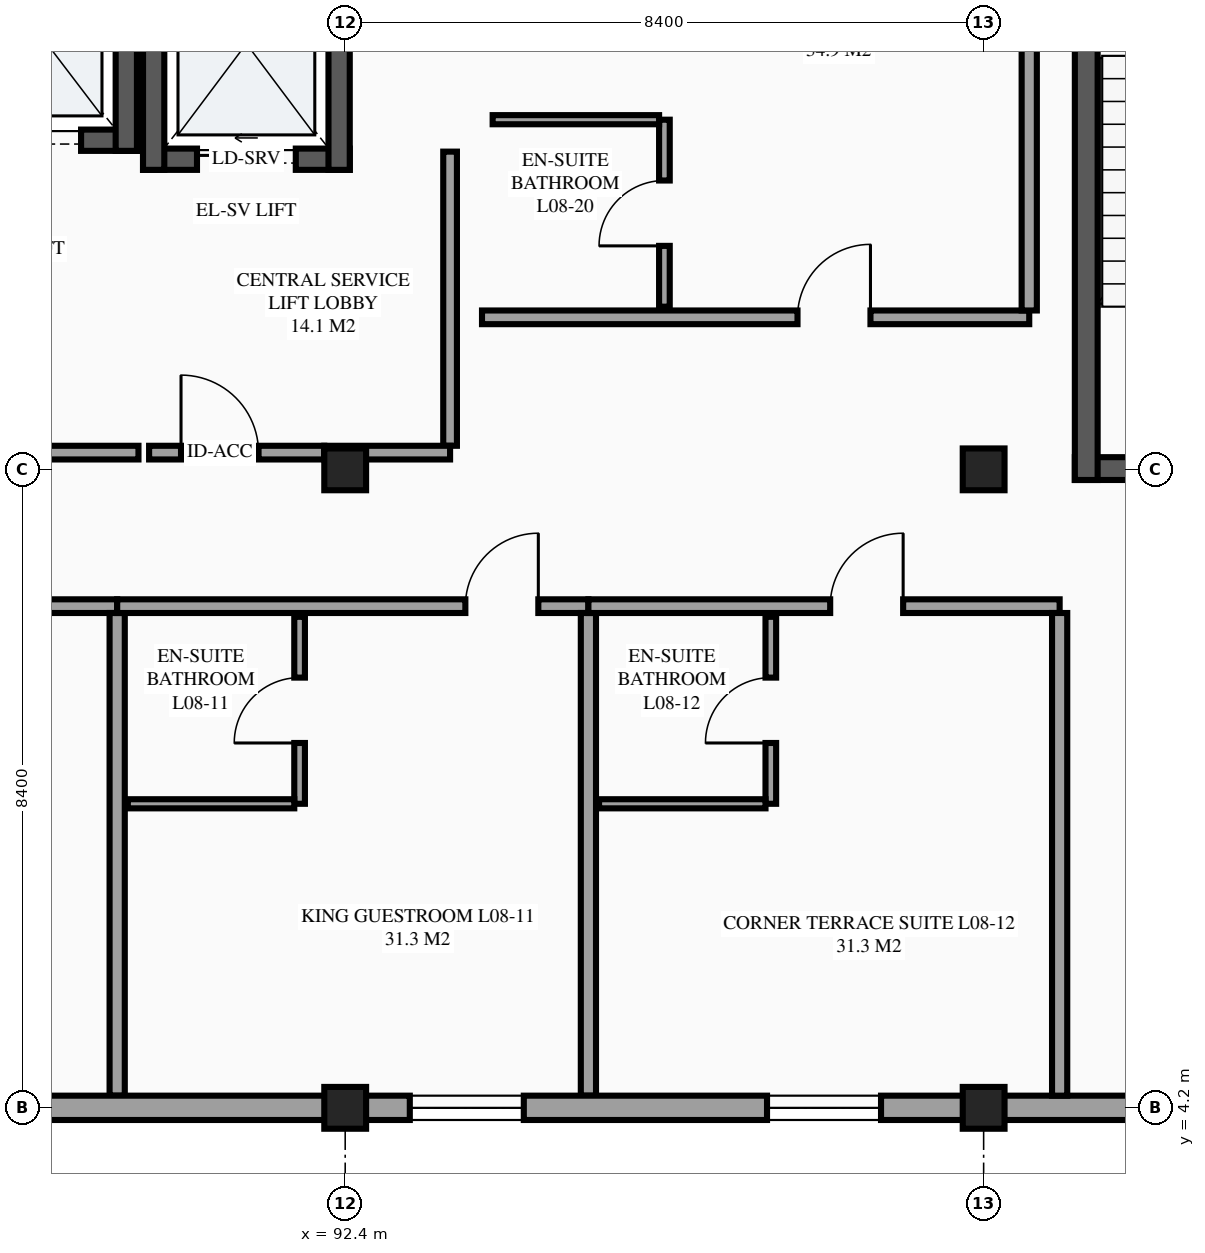
"""IFC4 building model, lengths in metres.
Left out: names, types, materials, properties, quantities, classifications, styles, units other than length and angle.
Written with IfcOpenShell. Run it as: python <this file> out.ifc"""

import sys

from ifc_helpers import new_model, si_unit, direction, frame, frame_2d, origin, origin_2d, place, context, subcontext, project, spatial, rectangle, extrude, element, fill, save


model = new_model("IFC4")
c1 = context("Model", 3, precision=1e-05, world=origin(), true_north=direction((0.0, 1.0)))
c2 = subcontext(c1, "Body", "Model", "MODEL_VIEW")
j1 = project(units=[si_unit("LENGTHUNIT", "METRE"), si_unit("PLANEANGLEUNIT", "RADIAN")], contexts=[c1])
p1 = place(None, origin())
s1 = spatial("IfcSite", under=j1, at=p1, CompositionType="ELEMENT")
p2 = place(p1, origin())
s2 = spatial("IfcBuilding", under=s1, at=p2, CompositionType="ELEMENT")
p3 = place(p2, frame((0.0, 0.0, 32.7)))
s3 = spatial("IfcBuildingStorey", under=s2, at=p3, CompositionType="ELEMENT", Elevation=32.7)
for number, where, z_axis, x_axis in (
    (1, (92.4, 4.2, 0.0), (0.0, 0.0, 1.0), (1.0, 0.0, 0.0)),
    (2, (92.4, 12.6, 0.0), (0.0, 0.0, 1.0), (1.0, 0.0, 0.0)),
    (3, (100.8, 4.2, 0.0), (0.0, 0.0, 1.0), (1.0, 0.0, 0.0)),
    (4, (100.8, 12.6, 0.0), (0.0, 0.0, 1.0), (1.0, 0.0, 0.0)),
):
    element("IfcColumn", number, at=place(p3, frame(where, z_axis=z_axis, x_axis=x_axis)), inside=s3, PredefinedType="COLUMN", context=c2, shape_type="SweptSolid", body=[
        extrude(rectangle(XDim=0.55, YDim=0.55, at=origin_2d()), origin(), (0.0, 0.0, 1.0), 3.6),
    ])
p4 = place(p3, frame((100.8, 4.2, 0.0), z_axis=(0.0, 0.0, 1.0), x_axis=(1.0, 0.0, 0.0)))
e5 = element("IfcWall", 5, at=p4, inside=s3, PredefinedType="STANDARD", context=c2, shape_type="SweptSolid", body=[
    extrude(rectangle(XDim=16.8, YDim=0.32, at=frame_2d((8.4, 0.0))), origin(), (0.0, 0.0, 1.0), 2.63),
])
p5 = place(p4, frame((10.6, 0.0, 0.85)))
e6 = element("IfcOpeningElement", 6, at=p5, cuts=e5, PredefinedType="OPENING", context=c2, shape_type="SweptSolid", body=[
    extrude(rectangle(XDim=1.2, YDim=1.5, at=frame_2d((0.6, 0.75))), frame((0.0, 0.17, 0.0), z_axis=(0.0, -1.0, 0.0), x_axis=(1.0, 0.0, 0.0)), (0.0, 0.0, 1.0), 0.34),
])
p6 = place(p3, frame((87.14, 16.93, 0.0), z_axis=(0.0, 0.0, 1.0), x_axis=(1.0, 0.0, 0.0)))
e7 = element("IfcWall", 7, at=p6, inside=s3, PredefinedType="SHEAR", context=c2, shape_type="SweptSolid", body=[
    extrude(rectangle(XDim=2.52, YDim=0.28, at=frame_2d((1.26, 0.0))), origin(), (0.0, 0.0, 1.0), 3.6),
])
p7 = place(p6, frame((0.735, 0.0, 0.0)))
e8 = element("IfcOpeningElement", 8, at=p7, cuts=e7, PredefinedType="OPENING", context=c2, shape_type="SweptSolid", body=[
    extrude(rectangle(XDim=1.05, YDim=2.2, at=frame_2d((0.525, 1.1))), frame((0.0, 0.15, 0.0), z_axis=(0.0, -1.0, 0.0), x_axis=(1.0, 0.0, 0.0)), (0.0, 0.0, 1.0), 0.3),
])
p8 = place(p3, frame((89.52, 16.79, 0.0), z_axis=(0.0, 0.0, 1.0), x_axis=(0.0, 1.0, 0.0)))
e9 = element("IfcWall", 9, at=p8, inside=s3, PredefinedType="SHEAR", context=c2, shape_type="SweptSolid", body=[
    extrude(rectangle(XDim=3.02, YDim=0.28, at=frame_2d((1.51, 0.0))), origin(), (0.0, 0.0, 1.0), 3.6),
])
p9 = place(p3, frame((89.74, 16.68, 0.0), z_axis=(0.0, 0.0, 1.0), x_axis=(1.0, 0.0, 0.0)))
e10 = element("IfcWall", 10, at=p9, inside=s3, PredefinedType="SHEAR", context=c2, shape_type="SweptSolid", body=[
    extrude(rectangle(XDim=2.72, YDim=0.28, at=frame_2d((1.36, 0.0))), origin(), (0.0, 0.0, 1.0), 3.6),
])
p10 = place(p9, frame((0.71, 0.0, 0.0)))
e11 = element("IfcOpeningElement", 11, at=p10, cuts=e10, PredefinedType="OPENING", context=c2, shape_type="SweptSolid", body=[
    extrude(rectangle(XDim=1.3, YDim=2.25, at=frame_2d((0.65, 1.125))), frame((0.0, 0.15, 0.0), z_axis=(0.0, -1.0, 0.0), x_axis=(1.0, 0.0, 0.0)), (0.0, 0.0, 1.0), 0.3),
])
for number, where, z_axis, x_axis in (
    (12, (92.32, 16.54, 0.0), (0.0, 0.0, 1.0), (0.0, 1.0, 0.0)),
    (13, (89.88, 19.86, 0.0), (0.0, 0.0, 1.0), (0.0, -1.0, 0.0)),
):
    element("IfcWall", number, at=place(p3, frame(where, z_axis=z_axis, x_axis=x_axis)), inside=s3, PredefinedType="SHEAR", context=c2, shape_type="SweptSolid", body=[
        extrude(rectangle(XDim=3.32, YDim=0.28, at=frame_2d((1.66, 0.0))), origin(), (0.0, 0.0, 1.0), 3.6),
    ])
p11 = place(p3, frame((102.0, 12.61, 0.0), z_axis=(0.0, 0.0, 1.0), x_axis=(1.0, 0.0, 0.0)))
e14 = element("IfcWall", 14, at=p11, inside=s3, PredefinedType="SHEAR", context=c2, shape_type="SweptSolid", body=[
    extrude(rectangle(XDim=5.2, YDim=0.3, at=frame_2d((2.6, 0.0))), origin(), (0.0, 0.0, 1.0), 3.6),
])
p12 = place(p11, frame((2.025, 0.0, 0.0)))
e15 = element("IfcOpeningElement", 15, at=p12, cuts=e14, PredefinedType="OPENING", context=c2, shape_type="SweptSolid", body=[
    extrude(rectangle(XDim=1.15, YDim=2.15, at=frame_2d((0.575, 1.075))), frame((0.0, 0.16, 0.0), z_axis=(0.0, -1.0, 0.0), x_axis=(1.0, 0.0, 0.0)), (0.0, 0.0, 1.0), 0.32),
])
p13 = place(p3, frame((102.15, 21.3, 0.0), z_axis=(0.0, 0.0, 1.0), x_axis=(0.0, -1.0, 0.0)))
e16 = element("IfcWall", 16, at=p13, inside=s3, PredefinedType="SHEAR", context=c2, shape_type="SweptSolid", body=[
    extrude(rectangle(XDim=8.84, YDim=0.3, at=frame_2d((4.42, 0.0))), origin(), (0.0, 0.0, 1.0), 3.6),
])
p14 = place(p3, frame((83.2, 10.8, 0.0), z_axis=(0.0, 0.0, 1.0), x_axis=(1.0, 0.0, 0.0)))
e17 = element("IfcWall", 17, at=p14, inside=s3, PredefinedType="PARTITIONING", context=c2, shape_type="SweptSolid", body=[
    extrude(rectangle(XDim=6.2, YDim=0.18, at=frame_2d((3.1, 0.0))), origin(), (0.0, 0.0, 1.0), 3.375),
])
p15 = place(p14, frame((4.231, 0.0, 0.0)))
e18 = element("IfcOpeningElement", 18, at=p15, cuts=e17, PredefinedType="OPENING", context=c2, shape_type="SweptSolid", body=[
    extrude(rectangle(XDim=0.96, YDim=2.15, at=frame_2d((0.48, 1.075))), frame((0.0, 0.1, 0.0), z_axis=(0.0, -1.0, 0.0), x_axis=(1.0, 0.0, 0.0)), (0.0, 0.0, 1.0), 0.2),
])
p16 = place(p3, frame((89.4, 4.36, 0.0), z_axis=(0.0, 0.0, 1.0), x_axis=(0.0, 1.0, 0.0)))
e19 = element("IfcWall", 19, at=p16, inside=s3, PredefinedType="PARTITIONING", context=c2, shape_type="SweptSolid", body=[
    extrude(rectangle(XDim=6.35, YDim=0.2, at=frame_2d((3.175, 0.0))), origin(), (0.0, 0.0, 1.0), 3.375),
])
p17 = place(p3, frame((89.4, 10.8, 0.0), z_axis=(0.0, 0.0, 1.0), x_axis=(1.0, 0.0, 0.0)))
e20 = element("IfcWall", 20, at=p17, inside=s3, PredefinedType="PARTITIONING", context=c2, shape_type="SweptSolid", body=[
    extrude(rectangle(XDim=6.2, YDim=0.18, at=frame_2d((3.1, 0.0))), origin(), (0.0, 0.0, 1.0), 3.375),
])
p18 = place(p17, frame((4.581, 0.0, 0.0)))
e21 = element("IfcOpeningElement", 21, at=p18, cuts=e20, PredefinedType="OPENING", context=c2, shape_type="SweptSolid", body=[
    extrude(rectangle(XDim=0.96, YDim=2.15, at=frame_2d((0.48, 1.075))), frame((0.0, 0.1, 0.0), z_axis=(0.0, -1.0, 0.0), x_axis=(1.0, 0.0, 0.0)), (0.0, 0.0, 1.0), 0.2),
])
p19 = place(p3, frame((95.6, 4.36, 0.0), z_axis=(0.0, 0.0, 1.0), x_axis=(0.0, 1.0, 0.0)))
e22 = element("IfcWall", 22, at=p19, inside=s3, PredefinedType="PARTITIONING", context=c2, shape_type="SweptSolid", body=[
    extrude(rectangle(XDim=6.35, YDim=0.2, at=frame_2d((3.175, 0.0))), origin(), (0.0, 0.0, 1.0), 3.375),
])
p20 = place(p3, frame((91.8, 8.2, 0.0), z_axis=(0.0, 0.0, 1.0), x_axis=(0.0, 1.0, 0.0)))
e23 = element("IfcWall", 23, at=p20, inside=s3, PredefinedType="PARTITIONING", context=c2, shape_type="SweptSolid", body=[
    extrude(rectangle(XDim=2.46, YDim=0.14, at=frame_2d((1.23, 0.0))), origin(), (0.0, 0.0, 1.0), 3.375),
])
p21 = place(p20, frame((0.8, 0.0, 0.0)))
e24 = element("IfcOpeningElement", 24, at=p21, cuts=e23, PredefinedType="OPENING", context=c2, shape_type="SweptSolid", body=[
    extrude(rectangle(XDim=0.86, YDim=2.1, at=frame_2d((0.43, 1.05))), frame((0.0, 0.08, 0.0), z_axis=(0.0, -1.0, 0.0), x_axis=(1.0, 0.0, 0.0)), (0.0, 0.0, 1.0), 0.16),
])
p22 = place(p3, frame((89.54, 8.2, 0.0), z_axis=(0.0, 0.0, 1.0), x_axis=(1.0, 0.0, 0.0)))
e25 = element("IfcWall", 25, at=p22, inside=s3, PredefinedType="PARTITIONING", context=c2, shape_type="SweptSolid", body=[
    extrude(rectangle(XDim=2.19, YDim=0.12, at=frame_2d((1.095, 0.0))), origin(), (0.0, 0.0, 1.0), 3.375),
])
p23 = place(p3, frame((95.6, 10.8, 0.0), z_axis=(0.0, 0.0, 1.0), x_axis=(1.0, 0.0, 0.0)))
e26 = element("IfcWall", 26, at=p23, inside=s3, PredefinedType="PARTITIONING", context=c2, shape_type="SweptSolid", body=[
    extrude(rectangle(XDim=6.2, YDim=0.18, at=frame_2d((3.1, 0.0))), origin(), (0.0, 0.0, 1.0), 3.375),
])
p24 = place(p23, frame((3.181, 0.0, 0.0)))
e27 = element("IfcOpeningElement", 27, at=p24, cuts=e26, PredefinedType="OPENING", context=c2, shape_type="SweptSolid", body=[
    extrude(rectangle(XDim=0.96, YDim=2.15, at=frame_2d((0.48, 1.075))), frame((0.0, 0.1, 0.0), z_axis=(0.0, -1.0, 0.0), x_axis=(1.0, 0.0, 0.0)), (0.0, 0.0, 1.0), 0.2),
])
p25 = place(p3, frame((101.8, 4.36, 0.0), z_axis=(0.0, 0.0, 1.0), x_axis=(0.0, 1.0, 0.0)))
e28 = element("IfcWall", 28, at=p25, inside=s3, PredefinedType="PARTITIONING", context=c2, shape_type="SweptSolid", body=[
    extrude(rectangle(XDim=6.35, YDim=0.2, at=frame_2d((3.175, 0.0))), origin(), (0.0, 0.0, 1.0), 3.375),
])
p26 = place(p3, frame((98.0, 8.2, 0.0), z_axis=(0.0, 0.0, 1.0), x_axis=(0.0, 1.0, 0.0)))
e29 = element("IfcWall", 29, at=p26, inside=s3, PredefinedType="PARTITIONING", context=c2, shape_type="SweptSolid", body=[
    extrude(rectangle(XDim=2.46, YDim=0.14, at=frame_2d((1.23, 0.0))), origin(), (0.0, 0.0, 1.0), 3.375),
])
p27 = place(p26, frame((0.8, 0.0, 0.0)))
e30 = element("IfcOpeningElement", 30, at=p27, cuts=e29, PredefinedType="OPENING", context=c2, shape_type="SweptSolid", body=[
    extrude(rectangle(XDim=0.86, YDim=2.1, at=frame_2d((0.43, 1.05))), frame((0.0, 0.08, 0.0), z_axis=(0.0, -1.0, 0.0), x_axis=(1.0, 0.0, 0.0)), (0.0, 0.0, 1.0), 0.16),
])
p28 = place(p3, frame((95.74, 8.2, 0.0), z_axis=(0.0, 0.0, 1.0), x_axis=(1.0, 0.0, 0.0)))
e31 = element("IfcWall", 31, at=p28, inside=s3, PredefinedType="PARTITIONING", context=c2, shape_type="SweptSolid", body=[
    extrude(rectangle(XDim=2.19, YDim=0.12, at=frame_2d((1.095, 0.0))), origin(), (0.0, 0.0, 1.0), 3.375),
])
p29 = place(p3, frame((94.2, 14.6, 0.0), z_axis=(0.0, 0.0, 1.0), x_axis=(1.0, 0.0, 0.0)))
e32 = element("IfcWall", 32, at=p29, inside=s3, PredefinedType="PARTITIONING", context=c2, shape_type="SweptSolid", body=[
    extrude(rectangle(XDim=7.2, YDim=0.18, at=frame_2d((3.6, 0.0))), origin(), (0.0, 0.0, 1.0), 3.375),
])
p30 = place(p29, frame((4.151, 0.0, 0.0)))
e33 = element("IfcOpeningElement", 33, at=p30, cuts=e32, PredefinedType="OPENING", context=c2, shape_type="SweptSolid", body=[
    extrude(rectangle(XDim=0.96, YDim=2.15, at=frame_2d((0.48, 1.075))), frame((0.0, 0.1, 0.0), z_axis=(0.0, -1.0, 0.0), x_axis=(1.0, 0.0, 0.0)), (0.0, 0.0, 1.0), 0.2),
])
p31 = place(p3, frame((101.4, 14.69, 0.0), z_axis=(0.0, 0.0, 1.0), x_axis=(0.0, 1.0, 0.0)))
e34 = element("IfcWall", 34, at=p31, inside=s3, PredefinedType="PARTITIONING", context=c2, shape_type="SweptSolid", body=[
    extrude(rectangle(XDim=6.15, YDim=0.2, at=frame_2d((3.075, 0.0))), origin(), (0.0, 0.0, 1.0), 3.375),
])
p32 = place(p3, frame((96.6, 14.74, 0.0), z_axis=(0.0, 0.0, 1.0), x_axis=(0.0, 1.0, 0.0)))
e35 = element("IfcWall", 35, at=p32, inside=s3, PredefinedType="PARTITIONING", context=c2, shape_type="SweptSolid", body=[
    extrude(rectangle(XDim=2.46, YDim=0.14, at=frame_2d((1.23, 0.0))), origin(), (0.0, 0.0, 1.0), 3.375),
])
p33 = place(p32, frame((0.8, 0.0, 0.0)))
e36 = element("IfcOpeningElement", 36, at=p33, cuts=e35, PredefinedType="OPENING", context=c2, shape_type="SweptSolid", body=[
    extrude(rectangle(XDim=0.86, YDim=2.1, at=frame_2d((0.43, 1.05))), frame((0.0, 0.08, 0.0), z_axis=(0.0, -1.0, 0.0), x_axis=(1.0, 0.0, 0.0)), (0.0, 0.0, 1.0), 0.16),
])
p34 = place(p3, frame((94.34, 17.2, 0.0), z_axis=(0.0, 0.0, 1.0), x_axis=(1.0, 0.0, 0.0)))
e37 = element("IfcWall", 37, at=p34, inside=s3, PredefinedType="PARTITIONING", context=c2, shape_type="SweptSolid", body=[
    extrude(rectangle(XDim=2.19, YDim=0.12, at=frame_2d((1.095, 0.0))), origin(), (0.0, 0.0, 1.0), 3.375),
])
p35 = place(p3, frame((84.22, 12.82, 0.0), z_axis=(0.0, 0.0, 1.0), x_axis=(1.0, 0.0, 0.0)))
e38 = element("IfcWall", 38, at=p35, inside=s3, PredefinedType="PARTITIONING", context=c2, shape_type="SweptSolid", body=[
    extrude(rectangle(XDim=5.46, YDim=0.18, at=frame_2d((2.73, 0.0))), origin(), (0.0, 0.0, 1.0), 2.73),
])
p36 = place(p35, frame((1.98, 0.0, 0.0)))
e39 = element("IfcOpeningElement", 39, at=p36, cuts=e38, PredefinedType="OPENING", context=c2, shape_type="SweptSolid", body=[
    extrude(rectangle(XDim=1.5, YDim=2.15, at=frame_2d((0.75, 1.075))), frame((0.0, 0.1, 0.0), z_axis=(0.0, -1.0, 0.0), x_axis=(1.0, 0.0, 0.0)), (0.0, 0.0, 1.0), 0.2),
])
p37 = place(p3, frame((89.82, 12.82, 0.0), z_axis=(0.0, 0.0, 1.0), x_axis=(1.0, 0.0, 0.0)))
e40 = element("IfcWall", 40, at=p37, inside=s3, PredefinedType="PARTITIONING", context=c2, shape_type="SweptSolid", body=[
    extrude(rectangle(XDim=2.305, YDim=0.18, at=frame_2d((1.152, 0.0))), origin(), (0.0, 0.0, 1.0), 2.73),
])
p38 = place(p37, frame((0.42, 0.0, 0.0)))
e41 = element("IfcOpeningElement", 41, at=p38, cuts=e40, PredefinedType="OPENING", context=c2, shape_type="SweptSolid", body=[
    extrude(rectangle(XDim=1.02, YDim=2.15, at=frame_2d((0.51, 1.075))), frame((0.0, 0.1, 0.0), z_axis=(0.0, -1.0, 0.0), x_axis=(1.0, 0.0, 0.0)), (0.0, 0.0, 1.0), 0.2),
])
p39 = place(p3, frame((93.78, 12.91, 0.0), z_axis=(0.0, 0.0, 1.0), x_axis=(0.0, 1.0, 0.0)))
e42 = element("IfcWall", 42, at=p39, inside=s3, PredefinedType="PARTITIONING", context=c2, shape_type="SweptSolid", body=[
    extrude(rectangle(XDim=3.87, YDim=0.18, at=frame_2d((1.935, 0.0))), origin(), (0.0, 0.0, 1.0), 3.375),
])
p40 = place(p3, frame((84.0, 4.2, 0.0), z_axis=(0.0, 0.0, 1.0), x_axis=(1.0, 0.0, 0.0)))
e43 = element("IfcWall", 43, at=p40, inside=s3, PredefinedType="STANDARD", context=c2, shape_type="SweptSolid", body=[
    extrude(rectangle(XDim=8.4, YDim=0.32, at=frame_2d((4.2, 0.0))), origin(), (0.0, 0.0, 1.0), 2.58),
])
p41 = place(p40, frame((1.55, 0.0, 0.85)))
e44 = element("IfcOpeningElement", 44, at=p41, cuts=e43, PredefinedType="OPENING", context=c2, shape_type="SweptSolid", body=[
    extrude(rectangle(XDim=1.5, YDim=1.5, at=frame_2d((0.75, 0.75))), frame((0.0, 0.17, 0.0), z_axis=(0.0, -1.0, 0.0), x_axis=(1.0, 0.0, 0.0)), (0.0, 0.0, 1.0), 0.34),
])
p42 = place(p3, frame((92.4, 4.2, 0.0), z_axis=(0.0, 0.0, 1.0), x_axis=(1.0, 0.0, 0.0)))
e45 = element("IfcWall", 45, at=p42, inside=s3, PredefinedType="STANDARD", context=c2, shape_type="SweptSolid", body=[
    extrude(rectangle(XDim=8.4, YDim=0.32, at=frame_2d((4.2, 0.0))), origin(), (0.0, 0.0, 1.0), 3.126),
])
p43 = place(p42, frame((0.85, 0.0, 0.85)))
e46 = element("IfcOpeningElement", 46, at=p43, cuts=e45, PredefinedType="OPENING", context=c2, shape_type="SweptSolid", body=[
    extrude(rectangle(XDim=1.5, YDim=1.5, at=frame_2d((0.75, 0.75))), frame((0.0, 0.17, 0.0), z_axis=(0.0, -1.0, 0.0), x_axis=(1.0, 0.0, 0.0)), (0.0, 0.0, 1.0), 0.34),
])
p44 = place(p42, frame((5.55, 0.0, 0.85)))
e47 = element("IfcOpeningElement", 47, at=p44, cuts=e45, PredefinedType="OPENING", context=c2, shape_type="SweptSolid", body=[
    extrude(rectangle(XDim=1.5, YDim=1.5, at=frame_2d((0.75, 0.75))), frame((0.0, 0.17, 0.0), z_axis=(0.0, -1.0, 0.0), x_axis=(1.0, 0.0, 0.0)), (0.0, 0.0, 1.0), 0.34),
])
p45 = place(p3, frame((92.125, 12.82, 0.0), z_axis=(0.0, 0.0, 1.0), x_axis=(1.0, 0.0, 0.0)))
e48 = element("IfcWall", 48, at=p45, inside=s3, PredefinedType="PARTITIONING", context=c2, shape_type="SweptSolid", body=[
    extrude(rectangle(XDim=1.655, YDim=0.18, at=frame_2d((0.828, 0.0))), origin(), (0.0, 0.0, 1.0), 3.375),
])
p46 = place(p43, origin())
e49 = element("IfcWindow", 49, at=p46, inside=s3, PartitioningType="SINGLE_PANEL", PredefinedType="WINDOW", context=c2, shape_type="SweptSolid", body=[
    extrude(rectangle(XDim=1.5, YDim=1.5, at=frame_2d((0.75, 0.75))), frame((0.0, 0.03, 0.0), z_axis=(0.0, -1.0, 0.0), x_axis=(1.0, 0.0, 0.0)), (0.0, 0.0, 1.0), 0.06),
])
fill(e46, e49)
p47 = place(p44, origin())
e50 = element("IfcWindow", 50, at=p47, inside=s3, PartitioningType="SINGLE_PANEL", PredefinedType="WINDOW", context=c2, shape_type="SweptSolid", body=[
    extrude(rectangle(XDim=1.5, YDim=1.5, at=frame_2d((0.75, 0.75))), frame((0.0, 0.03, 0.0), z_axis=(0.0, -1.0, 0.0), x_axis=(1.0, 0.0, 0.0)), (0.0, 0.0, 1.0), 0.06),
])
fill(e47, e50)
p48 = place(p7, origin())
e51 = element("IfcDoor", 51, at=p48, inside=s3, OperationType="SLIDING_TO_LEFT", PredefinedType="DOOR", context=c2, shape_type="SweptSolid", body=[
    extrude(rectangle(XDim=1.05, YDim=2.2, at=frame_2d((0.525, 1.1))), frame((0.0, 0.025, 0.0), z_axis=(0.0, -1.0, 0.0), x_axis=(1.0, 0.0, 0.0)), (0.0, 0.0, 1.0), 0.05),
])
fill(e8, e51)
p49 = place(p10, origin())
e52 = element("IfcDoor", 52, at=p49, inside=s3, OperationType="SLIDING_TO_LEFT", PredefinedType="DOOR", context=c2, shape_type="SweptSolid", body=[
    extrude(rectangle(XDim=1.3, YDim=2.25, at=frame_2d((0.65, 1.125))), frame((0.0, 0.025, 0.0), z_axis=(0.0, -1.0, 0.0), x_axis=(1.0, 0.0, 0.0)), (0.0, 0.0, 1.0), 0.05),
])
fill(e11, e52)
p50 = place(p18, origin())
e53 = element("IfcDoor", 53, at=p50, inside=s3, OperationType="SINGLE_SWING_RIGHT", PredefinedType="DOOR", context=c2, shape_type="SweptSolid", body=[
    extrude(rectangle(XDim=0.96, YDim=2.15, at=frame_2d((0.48, 1.075))), frame((0.0, 0.025, 0.0), z_axis=(0.0, -1.0, 0.0), x_axis=(1.0, 0.0, 0.0)), (0.0, 0.0, 1.0), 0.05),
])
fill(e21, e53)
p51 = place(p21, origin())
e54 = element("IfcDoor", 54, at=p51, inside=s3, OperationType="SINGLE_SWING_LEFT", PredefinedType="DOOR", context=c2, shape_type="SweptSolid", body=[
    extrude(rectangle(XDim=0.86, YDim=2.1, at=frame_2d((0.43, 1.05))), frame((0.0, 0.025, 0.0), z_axis=(0.0, -1.0, 0.0), x_axis=(1.0, 0.0, 0.0)), (0.0, 0.0, 1.0), 0.05),
])
fill(e24, e54)
p52 = place(p24, origin())
e55 = element("IfcDoor", 55, at=p52, inside=s3, OperationType="SINGLE_SWING_RIGHT", PredefinedType="DOOR", context=c2, shape_type="SweptSolid", body=[
    extrude(rectangle(XDim=0.96, YDim=2.15, at=frame_2d((0.48, 1.075))), frame((0.0, 0.025, 0.0), z_axis=(0.0, -1.0, 0.0), x_axis=(1.0, 0.0, 0.0)), (0.0, 0.0, 1.0), 0.05),
])
fill(e27, e55)
p53 = place(p27, origin())
e56 = element("IfcDoor", 56, at=p53, inside=s3, OperationType="SINGLE_SWING_LEFT", PredefinedType="DOOR", context=c2, shape_type="SweptSolid", body=[
    extrude(rectangle(XDim=0.86, YDim=2.1, at=frame_2d((0.43, 1.05))), frame((0.0, 0.025, 0.0), z_axis=(0.0, -1.0, 0.0), x_axis=(1.0, 0.0, 0.0)), (0.0, 0.0, 1.0), 0.05),
])
fill(e30, e56)
p54 = place(p30, origin())
e57 = element("IfcDoor", 57, at=p54, inside=s3, OperationType="SINGLE_SWING_RIGHT", PredefinedType="DOOR", context=c2, shape_type="SweptSolid", body=[
    extrude(rectangle(XDim=0.96, YDim=2.15, at=frame_2d((0.48, 1.075))), frame((0.0, 0.025, 0.0), z_axis=(0.0, -1.0, 0.0), x_axis=(1.0, 0.0, 0.0)), (0.0, 0.0, 1.0), 0.05),
])
fill(e33, e57)
p55 = place(p33, origin())
e58 = element("IfcDoor", 58, at=p55, inside=s3, OperationType="SINGLE_SWING_LEFT", PredefinedType="DOOR", context=c2, shape_type="SweptSolid", body=[
    extrude(rectangle(XDim=0.86, YDim=2.1, at=frame_2d((0.43, 1.05))), frame((0.0, 0.025, 0.0), z_axis=(0.0, -1.0, 0.0), x_axis=(1.0, 0.0, 0.0)), (0.0, 0.0, 1.0), 0.05),
])
fill(e36, e58)
p56 = place(p38, origin())
e59 = element("IfcDoor", 59, at=p56, inside=s3, OperationType="SINGLE_SWING_LEFT", PredefinedType="DOOR", context=c2, shape_type="SweptSolid", body=[
    extrude(rectangle(XDim=1.02, YDim=2.15, at=frame_2d((0.51, 1.075))), frame((0.0, 0.025, 0.0), z_axis=(0.0, -1.0, 0.0), x_axis=(1.0, 0.0, 0.0)), (0.0, 0.0, 1.0), 0.05),
])
fill(e41, e59)
save(model, sys.argv[1])
